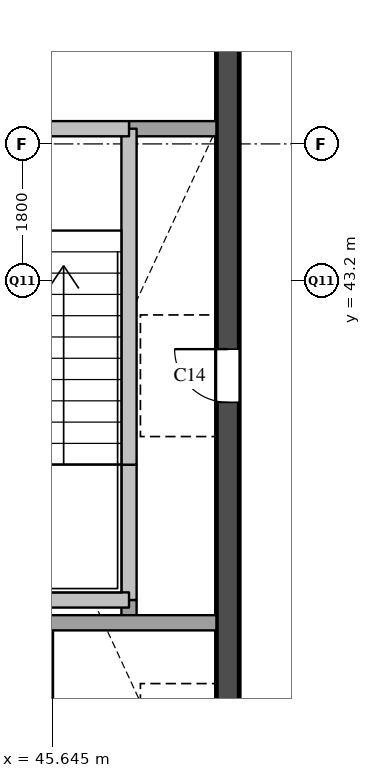
"""IFC4 building model, lengths in metres.
Left out: names, types, materials, properties, quantities, classifications, styles, units other than length and angle.
Written with IfcOpenShell. Run it as: python <this file> out.ifc"""

import sys

from ifc_helpers import new_model, si_unit, direction, frame, frame_2d, origin, place, context, subcontext, project, spatial, rectangle, extrude, element, fill, save


model = new_model("IFC4")
c1 = context("Model", 3, precision=1e-05, world=origin(), true_north=direction((0.0, 1.0)))
c2 = subcontext(c1, "Body", "Model", "MODEL_VIEW")
j1 = project(units=[si_unit("LENGTHUNIT", "METRE"), si_unit("PLANEANGLEUNIT", "RADIAN")], contexts=[c1])
p1 = place(None, origin())
s1 = spatial("IfcSite", under=j1, at=p1, CompositionType="ELEMENT")
p2 = place(p1, origin())
s2 = spatial("IfcBuilding", under=s1, at=p2, CompositionType="ELEMENT")
p3 = place(p2, frame((0.0, 0.0, 301.2)))
s3 = spatial("IfcBuildingStorey", under=s2, at=p3, CompositionType="ELEMENT", Elevation=301.2)
p4 = place(p3, frame((47.95, 29.1, 0.0), z_axis=(0.0, 0.0, 1.0), x_axis=(0.0, 1.0, 0.0)))
e1 = element("IfcWall", 1, at=p4, inside=s3, PredefinedType="SHEAR", context=c2, shape_type="SweptSolid", body=[
    extrude(rectangle(XDim=20.3, YDim=0.3, at=frame_2d((10.15, 0.0))), origin(), (0.0, 0.0, 1.0), 3.6),
])
p5 = place(p4, frame((12.5, 0.0, 0.0)))
e2 = element("IfcOpeningElement", 2, at=p5, cuts=e1, PredefinedType="OPENING", context=c2, shape_type="SweptSolid", body=[
    extrude(rectangle(XDim=0.7, YDim=2.1, at=frame_2d((0.35, 1.05))), frame((0.0, 0.16, 0.0), z_axis=(0.0, -1.0, 0.0), x_axis=(1.0, 0.0, 0.0)), (0.0, 0.0, 1.0), 0.32),
])
p6 = place(p4, frame((3.9, 0.0, 0.0)))
e3 = element("IfcOpeningElement", 3, at=p6, cuts=e1, PredefinedType="OPENING", context=c2, shape_type="SweptSolid", body=[
    extrude(rectangle(XDim=1.8, YDim=2.1, at=frame_2d((0.9, 1.05))), frame((0.0, 0.16, 0.0), z_axis=(0.0, -1.0, 0.0), x_axis=(1.0, 0.0, 0.0)), (0.0, 0.0, 1.0), 0.32),
])
p7 = place(p3, frame((45.55, 35.5, 0.0), z_axis=(0.0, 0.0, 1.0), x_axis=(0.0, 1.0, 0.0)))
e4 = element("IfcWall", 4, at=p7, inside=s3, PredefinedType="SOLIDWALL", context=c2, shape_type="SweptSolid", body=[
    extrude(rectangle(XDim=3.2, YDim=0.2, at=frame_2d((1.6, 0.0))), origin(), (0.0, 0.0, 1.0), 3.6),
])
p8 = place(p3, frame((46.65, 38.7, 0.0), z_axis=(0.0, 0.0, 1.0), x_axis=(0.0, 1.0, 0.0)))
e5 = element("IfcWall", 5, at=p8, inside=s3, PredefinedType="SOLIDWALL", context=c2, shape_type="SweptSolid", body=[
    extrude(rectangle(XDim=0.3, YDim=0.2, at=frame_2d((0.15, 0.0))), origin(), (0.0, 0.0, 1.0), 3.6),
])
p9 = place(p3, frame((46.65, 39.0, 0.0), z_axis=(0.0, 0.0, 1.0), x_axis=(0.0, 1.0, 0.0)))
e6 = element("IfcWall", 6, at=p9, inside=s3, PredefinedType="SOLIDWALL", context=c2, shape_type="SweptSolid", body=[
    extrude(rectangle(XDim=1.78, YDim=0.2, at=frame_2d((0.89, 0.0))), origin(), (0.0, 0.0, 1.0), 3.6),
])
p10 = place(p3, frame((46.65, 40.78, 0.0), z_axis=(0.0, 0.0, 1.0), x_axis=(0.0, 1.0, 0.0)))
e7 = element("IfcWall", 7, at=p10, inside=s3, PredefinedType="SOLIDWALL", context=c2, shape_type="SweptSolid", body=[
    extrude(rectangle(XDim=4.42, YDim=0.2, at=frame_2d((2.21, 0.0))), origin(), (0.0, 0.0, 1.0), 3.6),
])
p11 = place(p3, frame((43.3, 38.7, 0.0), z_axis=(0.0, 0.0, 1.0), x_axis=(1.0, 0.0, 0.0)))
e8 = element("IfcWall", 8, at=p11, inside=s3, PredefinedType="SOLIDWALL", context=c2, shape_type="SweptSolid", body=[
    extrude(rectangle(XDim=4.5, YDim=0.2, at=frame_2d((2.25, 0.0))), origin(), (0.0, 0.0, 1.0), 3.6),
])
p12 = place(p3, frame((43.4, 39.0, 0.0), z_axis=(0.0, 0.0, 1.0), x_axis=(1.0, 0.0, 0.0)))
e9 = element("IfcWall", 9, at=p12, inside=s3, PredefinedType="SOLIDWALL", context=c2, shape_type="SweptSolid", body=[
    extrude(rectangle(XDim=3.25, YDim=0.2, at=frame_2d((1.625, 0.0))), origin(), (0.0, 0.0, 1.0), 3.6),
])
p13 = place(p3, frame((46.65, 45.2, 0.0), z_axis=(0.0, 0.0, 1.0), x_axis=(1.0, 0.0, 0.0)))
e10 = element("IfcWall", 10, at=p13, inside=s3, PredefinedType="SOLIDWALL", context=c2, shape_type="SweptSolid", body=[
    extrude(rectangle(XDim=1.15, YDim=0.2, at=frame_2d((0.575, 0.0))), origin(), (0.0, 0.0, 1.0), 3.6),
])
p14 = place(p3, frame((36.6, 45.2, 0.0), z_axis=(0.0, 0.0, 1.0), x_axis=(1.0, 0.0, 0.0)))
e11 = element("IfcWall", 11, at=p14, inside=s3, PredefinedType="SOLIDWALL", context=c2, shape_type="SweptSolid", body=[
    extrude(rectangle(XDim=10.05, YDim=0.2, at=frame_2d((5.025, 0.0))), origin(), (0.0, 0.0, 1.0), 3.6),
])
p15 = place(p14, frame((1.125, 0.0, 0.0)))
e12 = element("IfcOpeningElement", 12, at=p15, cuts=e11, PredefinedType="OPENING", context=c2, shape_type="SweptSolid", body=[
    extrude(rectangle(XDim=1.1, YDim=2.1, at=frame_2d((0.55, 1.05))), frame((0.0, 0.11, 0.0), z_axis=(0.0, -1.0, 0.0), x_axis=(1.0, 0.0, 0.0)), (0.0, 0.0, 1.0), 0.22),
])
p16 = place(p14, frame((4.475, 0.0, 0.0)))
e13 = element("IfcOpeningElement", 13, at=p16, cuts=e11, PredefinedType="OPENING", context=c2, shape_type="SweptSolid", body=[
    extrude(rectangle(XDim=1.1, YDim=2.1, at=frame_2d((0.55, 1.05))), frame((0.0, 0.11, 0.0), z_axis=(0.0, -1.0, 0.0), x_axis=(1.0, 0.0, 0.0)), (0.0, 0.0, 1.0), 0.22),
])
p17 = place(p14, frame((7.825, 0.0, 0.0)))
e14 = element("IfcOpeningElement", 14, at=p17, cuts=e11, PredefinedType="OPENING", context=c2, shape_type="SweptSolid", body=[
    extrude(rectangle(XDim=1.1, YDim=2.1, at=frame_2d((0.55, 1.05))), frame((0.0, 0.11, 0.0), z_axis=(0.0, -1.0, 0.0), x_axis=(1.0, 0.0, 0.0)), (0.0, 0.0, 1.0), 0.22),
])
p18 = place(p5, origin())
e15 = element("IfcDoor", 15, at=p18, inside=s3, OperationType="SINGLE_SWING_RIGHT", PredefinedType="DOOR", context=c2, shape_type="SweptSolid", body=[
    extrude(rectangle(XDim=0.7, YDim=2.1, at=frame_2d((0.35, 1.05))), frame((0.0, 0.025, 0.0), z_axis=(0.0, -1.0, 0.0), x_axis=(1.0, 0.0, 0.0)), (0.0, 0.0, 1.0), 0.05),
])
fill(e2, e15)
save(model, sys.argv[1])
